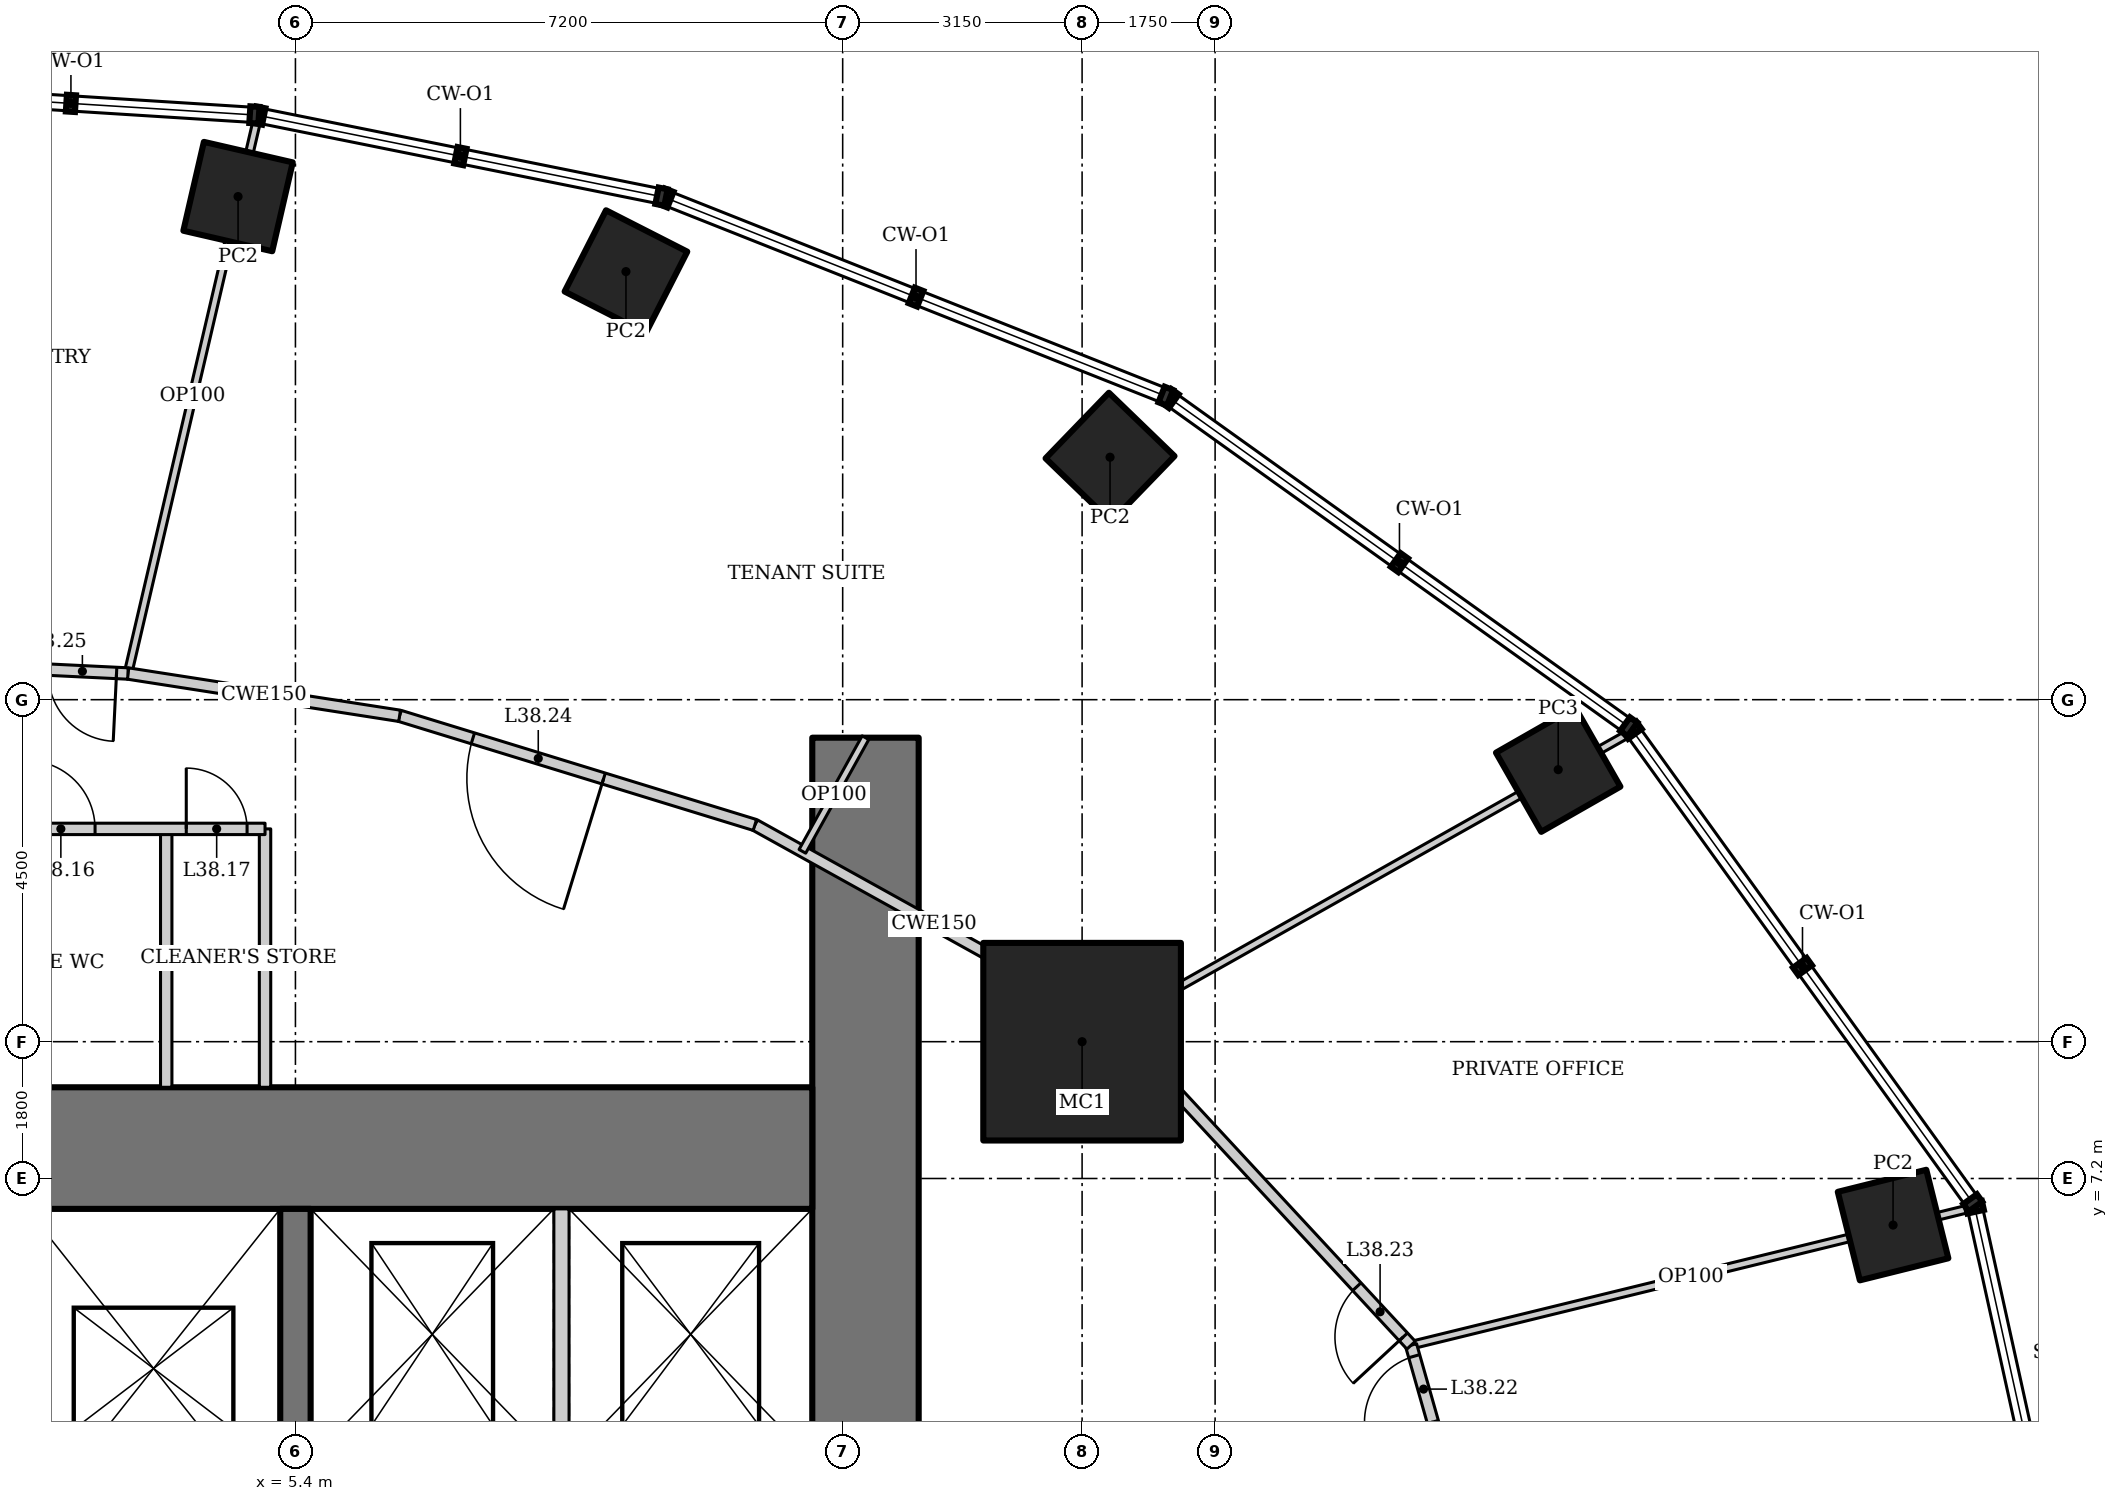
"""IFC4 building model, lengths in metres.
Left out: names, types, materials, properties, quantities, classifications, styles, units other than length and angle.
Written with IfcOpenShell. Run it as: python <this file> out.ifc"""

import sys

from ifc_helpers import new_model, si_unit, direction, frame, frame_2d, origin, origin_2d, place, context, subcontext, project, spatial, rectangle, hollow_rectangle, extrude, element, fill, save


model = new_model("IFC4")
c1 = context("Model", 3, precision=1e-05, world=origin(), true_north=direction((0.0, 1.0)))
c2 = subcontext(c1, "Body", "Model", "MODEL_VIEW")
j1 = project(units=[si_unit("LENGTHUNIT", "METRE"), si_unit("PLANEANGLEUNIT", "RADIAN")], contexts=[c1])
p1 = place(None, origin())
s1 = spatial("IfcSite", under=j1, at=p1, CompositionType="ELEMENT")
p2 = place(p1, origin())
s2 = spatial("IfcBuilding", under=s1, at=p2, CompositionType="ELEMENT")
p3 = place(p2, frame((0.0, 0.0, 163.6)))
s3 = spatial("IfcBuildingStorey", under=s2, at=p3, CompositionType="ELEMENT", Elevation=163.6)
p4 = place(p3, frame((15.75, 9.0, 0.0), z_axis=(0.0, 0.0, 1.0), x_axis=(1.0, 0.0, 0.0)))
e1 = element("IfcColumn", 1, at=p4, inside=s3, PredefinedType="COLUMN", context=c2, shape_type="SweptSolid", body=[
    extrude(hollow_rectangle(XDim=2.6, YDim=2.6, WallThickness=0.13, at=origin_2d()), origin(), (0.0, 0.0, 1.0), 4.2),
])
p5 = place(p3, frame((26.42, 6.587, 0.0), z_axis=(0.0, 0.0, 1.0), x_axis=(0.970295726276, 0.2419218956, 0.0)))
e2 = element("IfcColumn", 2, at=p5, inside=s3, PredefinedType="COLUMN", context=c2, shape_type="SweptSolid", body=[
    extrude(hollow_rectangle(XDim=1.2, YDim=1.2, WallThickness=0.1, at=origin_2d()), origin(), (0.0, 0.0, 1.0), 4.2),
])
p6 = place(p3, frame((22.014, 12.579, 0.0), z_axis=(0.0, 0.0, 1.0), x_axis=(0.86824298017, 0.496139221777, 0.0)))
e3 = element("IfcColumn", 3, at=p6, inside=s3, PredefinedType="COLUMN", context=c2, shape_type="SweptSolid", body=[
    extrude(hollow_rectangle(XDim=1.2, YDim=1.2, WallThickness=0.12, at=origin_2d()), origin(), (0.0, 0.0, 1.0), 4.2),
])
for number, where, z_axis, x_axis in (
    (4, (16.118, 16.69, 0.0), (0.0, 0.0, 1.0), (0.695, 0.719, 0.0)),
    (5, (9.749, 19.133, 0.0), (0.0, 0.0, 1.0), (0.454, 0.891, 0.0)),
    (6, (4.645, 20.12, 0.0), (0.0, 0.0, 1.0), (0.225, 0.974, 0.0)),
):
    element("IfcColumn", number, at=place(p3, frame(where, z_axis=z_axis, x_axis=x_axis)), inside=s3, PredefinedType="COLUMN", context=c2, shape_type="SweptSolid", body=[
        extrude(hollow_rectangle(XDim=1.2, YDim=1.2, WallThickness=0.1, at=origin_2d()), origin(), (0.0, 0.0, 1.0), 4.2),
    ])
p7 = place(p3, frame((12.9, -13.0, 0.0), z_axis=(0.0, 0.0, 1.0), x_axis=(0.0, 1.0, 0.0)))
e7 = element("IfcWall", 7, at=p7, inside=s3, PredefinedType="SHEAR", context=c2, shape_type="SweptSolid", body=[
    extrude(rectangle(XDim=26.0, YDim=1.4, at=frame_2d((13.0, 0.0))), origin(), (0.0, 0.0, 1.0), 4.2),
])
p8 = place(p7, frame((12.1, 0.0, 0.0)))
e8 = element("IfcOpeningElement", 8, at=p8, cuts=e7, PredefinedType="OPENING", context=c2, shape_type="SweptSolid", body=[
    extrude(rectangle(XDim=1.8, YDim=2.1, at=frame_2d((0.9, 1.05))), frame((0.0, 0.71, 0.0), z_axis=(0.0, -1.0, 0.0), x_axis=(1.0, 0.0, 0.0)), (0.0, 0.0, 1.0), 1.42),
])
p9 = place(p3, frame((12.2, 7.6, 0.0), z_axis=(0.0, 0.0, 1.0), x_axis=(-1.0, 0.0, 0.0)))
e9 = element("IfcWall", 9, at=p9, inside=s3, PredefinedType="SHEAR", context=c2, shape_type="SweptSolid", body=[
    extrude(rectangle(XDim=24.4, YDim=1.6, at=frame_2d((12.2, 0.0))), origin(), (0.0, 0.0, 1.0), 4.2),
])
p10 = place(p3, frame((5.4, -6.8, 0.0), z_axis=(0.0, 0.0, 1.0), x_axis=(0.0, 1.0, 0.0)))
e10 = element("IfcWall", 10, at=p10, inside=s3, PredefinedType="SHEAR", context=c2, shape_type="SweptSolid", body=[
    extrude(rectangle(XDim=13.6, YDim=0.4, at=frame_2d((6.8, 0.0))), origin(), (0.0, 0.0, 1.0), 4.2),
])
p11 = place(p10, frame((5.9, 0.0, 0.0)))
e11 = element("IfcOpeningElement", 11, at=p11, cuts=e10, PredefinedType="OPENING", context=c2, shape_type="SweptSolid", body=[
    extrude(rectangle(XDim=1.8, YDim=2.1, at=frame_2d((0.9, 1.05))), frame((0.0, 0.21, 0.0), z_axis=(0.0, -1.0, 0.0), x_axis=(1.0, 0.0, 0.0)), (0.0, 0.0, 1.0), 0.42),
])
p12 = place(p3, frame((8.9, 3.5, 0.0), z_axis=(0.0, 0.0, 1.0), x_axis=(0.0, 1.0, 0.0)))
e12 = element("IfcWall", 12, at=p12, inside=s3, PredefinedType="SOLIDWALL", context=c2, shape_type="SweptSolid", body=[
    extrude(rectangle(XDim=3.3, YDim=0.2, at=frame_2d((1.65, 0.0))), origin(), (0.0, 0.0, 1.0), 4.2),
])
p13 = place(p3, frame((27.441, 6.809, 0.0), z_axis=(0.0, 0.0, 1.0), x_axis=(-0.971305815804, -0.237834001323, 0.0)))
e13 = element("IfcWall", 13, at=p13, inside=s3, PredefinedType="PARTITIONING", context=c2, shape_type="SweptSolid", body=[
    extrude(rectangle(XDim=7.58, YDim=0.1, at=frame_2d((3.79, 0.0))), origin(), (0.0, 0.0, 1.0), 3.113),
])
p14 = place(p3, frame((22.949, 13.059, 0.0), z_axis=(0.0, 0.0, 1.0), x_axis=(-0.871274989434, -0.490795163777, 0.0)))
e14 = element("IfcWall", 14, at=p14, inside=s3, PredefinedType="PARTITIONING", context=c2, shape_type="SweptSolid", body=[
    extrude(rectangle(XDim=7.792, YDim=0.1, at=frame_2d((3.896, 0.0))), origin(), (0.0, 0.0, 1.0), 3.45),
])
p15 = place(p3, frame((4.897, 21.135, 0.0), z_axis=(0.0, 0.0, 1.0), x_axis=(-0.227181159974, -0.973852514785, 0.0)))
e15 = element("IfcWall", 15, at=p15, inside=s3, PredefinedType="PARTITIONING", context=c2, shape_type="SweptSolid", body=[
    extrude(rectangle(XDim=7.486, YDim=0.1, at=frame_2d((3.743, 0.0))), origin(), (0.0, 0.0, 1.0), 3.293),
])
p16 = place(p3, frame((21.5, 0.0, 0.0), z_axis=(0.0, 0.0, 1.0), x_axis=(-0.273177936169, 0.961963520717, 0.0)))
e16 = element("IfcWall", 16, at=p16, inside=s3, PredefinedType="PARTITIONING", context=c2, shape_type="SweptSolid", body=[
    extrude(rectangle(XDim=5.204, YDim=0.15, at=frame_2d((2.602, 0.0))), origin(), (0.0, 0.0, 1.0), 4.05),
])
p17 = place(p16, frame((4.154, 0.0, 0.0)))
e17 = element("IfcOpeningElement", 17, at=p17, cuts=e16, PredefinedType="OPENING", context=c2, shape_type="SweptSolid", body=[
    extrude(rectangle(XDim=0.9, YDim=2.1, at=frame_2d((0.45, 1.05))), frame((0.0, 0.085, 0.0), z_axis=(0.0, -1.0, 0.0), x_axis=(1.0, 0.0, 0.0)), (0.0, 0.0, 1.0), 0.17),
])
p18 = place(p3, frame((20.078, 5.006, 0.0), z_axis=(0.0, 0.0, 1.0), x_axis=(-0.679724658223, 0.733467374191, 0.0)))
e18 = element("IfcWall", 18, at=p18, inside=s3, PredefinedType="PARTITIONING", context=c2, shape_type="SweptSolid", body=[
    extrude(rectangle(XDim=5.765, YDim=0.15, at=frame_2d((2.882, 0.0))), origin(), (0.0, 0.0, 1.0), 4.05),
])
p19 = place(p18, frame((0.15, 0.0, 0.0)))
e19 = element("IfcOpeningElement", 19, at=p19, cuts=e18, PredefinedType="OPENING", context=c2, shape_type="SweptSolid", body=[
    extrude(rectangle(XDim=0.9, YDim=2.1, at=frame_2d((0.45, 1.05))), frame((0.0, 0.085, 0.0), z_axis=(0.0, -1.0, 0.0), x_axis=(1.0, 0.0, 0.0)), (0.0, 0.0, 1.0), 0.17),
])
p20 = place(p3, frame((16.16, 9.234, 0.0), z_axis=(0.0, 0.0, 1.0), x_axis=(-0.87433873028, 0.485316169865, 0.0)))
e20 = element("IfcWall", 20, at=p20, inside=s3, PredefinedType="PARTITIONING", context=c2, shape_type="SweptSolid", body=[
    extrude(rectangle(XDim=5.393, YDim=0.15, at=frame_2d((2.696, 0.0))), origin(), (0.0, 0.0, 1.0), 4.05),
])
p21 = place(p3, frame((11.445, 11.852, 0.0), z_axis=(0.0, 0.0, 1.0), x_axis=(-0.955892284323, 0.293717450573, 0.0)))
e21 = element("IfcWall", 21, at=p21, inside=s3, PredefinedType="PARTITIONING", context=c2, shape_type="SweptSolid", body=[
    extrude(rectangle(XDim=4.89, YDim=0.15, at=frame_2d((2.445, 0.0))), origin(), (0.0, 0.0, 1.0), 4.05),
])
p22 = place(p21, frame((2.082, 0.0, 0.0)))
e22 = element("IfcOpeningElement", 22, at=p22, cuts=e21, PredefinedType="OPENING", context=c2, shape_type="SweptSolid", body=[
    extrude(rectangle(XDim=1.8, YDim=2.1, at=frame_2d((0.9, 1.05))), frame((0.0, 0.085, 0.0), z_axis=(0.0, -1.0, 0.0), x_axis=(1.0, 0.0, 0.0)), (0.0, 0.0, 1.0), 0.17),
])
p23 = place(p3, frame((6.771, 13.288, 0.0), z_axis=(0.0, 0.0, 1.0), x_axis=(-0.98808911792, 0.153882731479, 0.0)))
e23 = element("IfcWall", 23, at=p23, inside=s3, PredefinedType="PARTITIONING", context=c2, shape_type="SweptSolid", body=[
    extrude(rectangle(XDim=3.617, YDim=0.15, at=frame_2d((1.809, 0.0))), origin(), (0.0, 0.0, 1.0), 4.05),
])
for number, where, z_axis, x_axis in (
    (24, (5.0, 8.4, 0.0), (0.0, 0.0, 1.0), (0.0, 1.0, 0.0)),
    (25, (3.7, 8.4, 0.0), (0.0, 0.0, 1.0), (0.0, 1.0, 0.0)),
):
    element("IfcWall", number, at=place(p3, frame(where, z_axis=z_axis, x_axis=x_axis)), inside=s3, PredefinedType="SOLIDWALL", context=c2, shape_type="SweptSolid", body=[
        extrude(rectangle(XDim=3.4, YDim=0.15, at=frame_2d((1.7, 0.0))), origin(), (0.0, 0.0, 1.0), 4.05),
    ])
p24 = place(p3, frame((12.9, 13.0, 0.0), z_axis=(0.0, 0.0, 1.0), x_axis=(-0.485339901234, -0.87432555737, 0.0)))
e26 = element("IfcWall", 26, at=p24, inside=s3, PredefinedType="PARTITIONING", context=c2, shape_type="SweptSolid", body=[
    extrude(rectangle(XDim=1.71, YDim=0.1, at=frame_2d((0.855, 0.0))), origin(), (0.0, 0.0, 1.0), 4.05),
])
p25 = place(p3, frame((3.196, 13.844, 0.0), z_axis=(0.0, 0.0, 1.0), x_axis=(-0.998823043489, 0.048502863789, 0.0)))
e27 = element("IfcWall", 27, at=p25, inside=s3, PredefinedType="PARTITIONING", context=c2, shape_type="SweptSolid", body=[
    extrude(rectangle(XDim=1.163, YDim=0.15, at=frame_2d((0.582, 0.0))), origin(), (0.0, 0.0, 1.0), 4.05),
])
p26 = place(p25, frame((0.15, 0.0, 0.0)))
e28 = element("IfcOpeningElement", 28, at=p26, cuts=e27, PredefinedType="OPENING", context=c2, shape_type="SweptSolid", body=[
    extrude(rectangle(XDim=0.9, YDim=2.1, at=frame_2d((0.45, 1.05))), frame((0.0, 0.085, 0.0), z_axis=(0.0, -1.0, 0.0), x_axis=(1.0, 0.0, 0.0)), (0.0, 0.0, 1.0), 0.17),
])
p27 = place(p3, frame((1.764, 11.8, 0.0), z_axis=(0.0, 0.0, 1.0), x_axis=(1.0, 0.0, 0.0)))
e29 = element("IfcWall", 29, at=p27, inside=s3, PredefinedType="SOLIDWALL", context=c2, shape_type="SweptSolid", body=[
    extrude(rectangle(XDim=3.236, YDim=0.15, at=frame_2d((1.618, 0.0))), origin(), (0.0, 0.0, 1.0), 4.05),
])
p28 = place(p27, frame((0.1, 0.0, 0.0)))
e30 = element("IfcOpeningElement", 30, at=p28, cuts=e29, PredefinedType="OPENING", context=c2, shape_type="SweptSolid", body=[
    extrude(rectangle(XDim=0.9, YDim=2.1, at=frame_2d((0.45, 1.05))), frame((0.0, 0.085, 0.0), z_axis=(0.0, -1.0, 0.0), x_axis=(1.0, 0.0, 0.0)), (0.0, 0.0, 1.0), 0.17),
])
p29 = place(p27, frame((2.2, 0.0, 0.0)))
e31 = element("IfcOpeningElement", 31, at=p29, cuts=e29, PredefinedType="OPENING", context=c2, shape_type="SweptSolid", body=[
    extrude(rectangle(XDim=0.8, YDim=2.1, at=frame_2d((0.4, 1.05))), frame((0.0, 0.085, 0.0), z_axis=(0.0, -1.0, 0.0), x_axis=(1.0, 0.0, 0.0)), (0.0, 0.0, 1.0), 0.17),
])
p30 = place(p28, origin())
e32 = element("IfcDoor", 32, at=p30, inside=s3, OperationType="SINGLE_SWING_LEFT", PredefinedType="DOOR", context=c2, shape_type="SweptSolid", body=[
    extrude(rectangle(XDim=0.9, YDim=2.1, at=frame_2d((0.45, 1.05))), frame((0.0, 0.025, 0.0), z_axis=(0.0, -1.0, 0.0), x_axis=(1.0, 0.0, 0.0)), (0.0, 0.0, 1.0), 0.05),
])
fill(e30, e32)
p31 = place(p29, origin())
e33 = element("IfcDoor", 33, at=p31, inside=s3, OperationType="SINGLE_SWING_LEFT", PredefinedType="DOOR", context=c2, shape_type="SweptSolid", body=[
    extrude(rectangle(XDim=0.8, YDim=2.1, at=frame_2d((0.4, 1.05))), frame((0.0, 0.025, 0.0), z_axis=(0.0, -1.0, 0.0), x_axis=(1.0, 0.0, 0.0)), (0.0, 0.0, 1.0), 0.05),
])
fill(e31, e33)
p32 = place(p17, origin())
e34 = element("IfcDoor", 34, at=p32, inside=s3, OperationType="SINGLE_SWING_LEFT", PredefinedType="DOOR", context=c2, shape_type="SweptSolid", body=[
    extrude(rectangle(XDim=0.9, YDim=2.1, at=frame_2d((0.45, 1.05))), frame((0.0, 0.025, 0.0), z_axis=(0.0, -1.0, 0.0), x_axis=(1.0, 0.0, 0.0)), (0.0, 0.0, 1.0), 0.05),
])
fill(e17, e34)
p33 = place(p19, origin())
e35 = element("IfcDoor", 35, at=p33, inside=s3, OperationType="SINGLE_SWING_LEFT", PredefinedType="DOOR", context=c2, shape_type="SweptSolid", body=[
    extrude(rectangle(XDim=0.9, YDim=2.1, at=frame_2d((0.45, 1.05))), frame((0.0, 0.025, 0.0), z_axis=(0.0, -1.0, 0.0), x_axis=(1.0, 0.0, 0.0)), (0.0, 0.0, 1.0), 0.05),
])
fill(e19, e35)
p34 = place(p22, origin())
e36 = element("IfcDoor", 36, at=p34, inside=s3, OperationType="DOUBLE_DOOR_DOUBLE_SWING", PredefinedType="DOOR", context=c2, shape_type="SweptSolid", body=[
    extrude(rectangle(XDim=1.8, YDim=2.1, at=frame_2d((0.9, 1.05))), frame((0.0, 0.025, 0.0), z_axis=(0.0, -1.0, 0.0), x_axis=(1.0, 0.0, 0.0)), (0.0, 0.0, 1.0), 0.05),
])
fill(e22, e36)
p35 = place(p26, origin())
e37 = element("IfcDoor", 37, at=p35, inside=s3, OperationType="SINGLE_SWING_LEFT", PredefinedType="DOOR", context=c2, shape_type="SweptSolid", body=[
    extrude(rectangle(XDim=0.9, YDim=2.1, at=frame_2d((0.45, 1.05))), frame((0.0, 0.025, 0.0), z_axis=(0.0, -1.0, 0.0), x_axis=(1.0, 0.0, 0.0)), (0.0, 0.0, 1.0), 0.05),
])
fill(e28, e37)
save(model, sys.argv[1])
